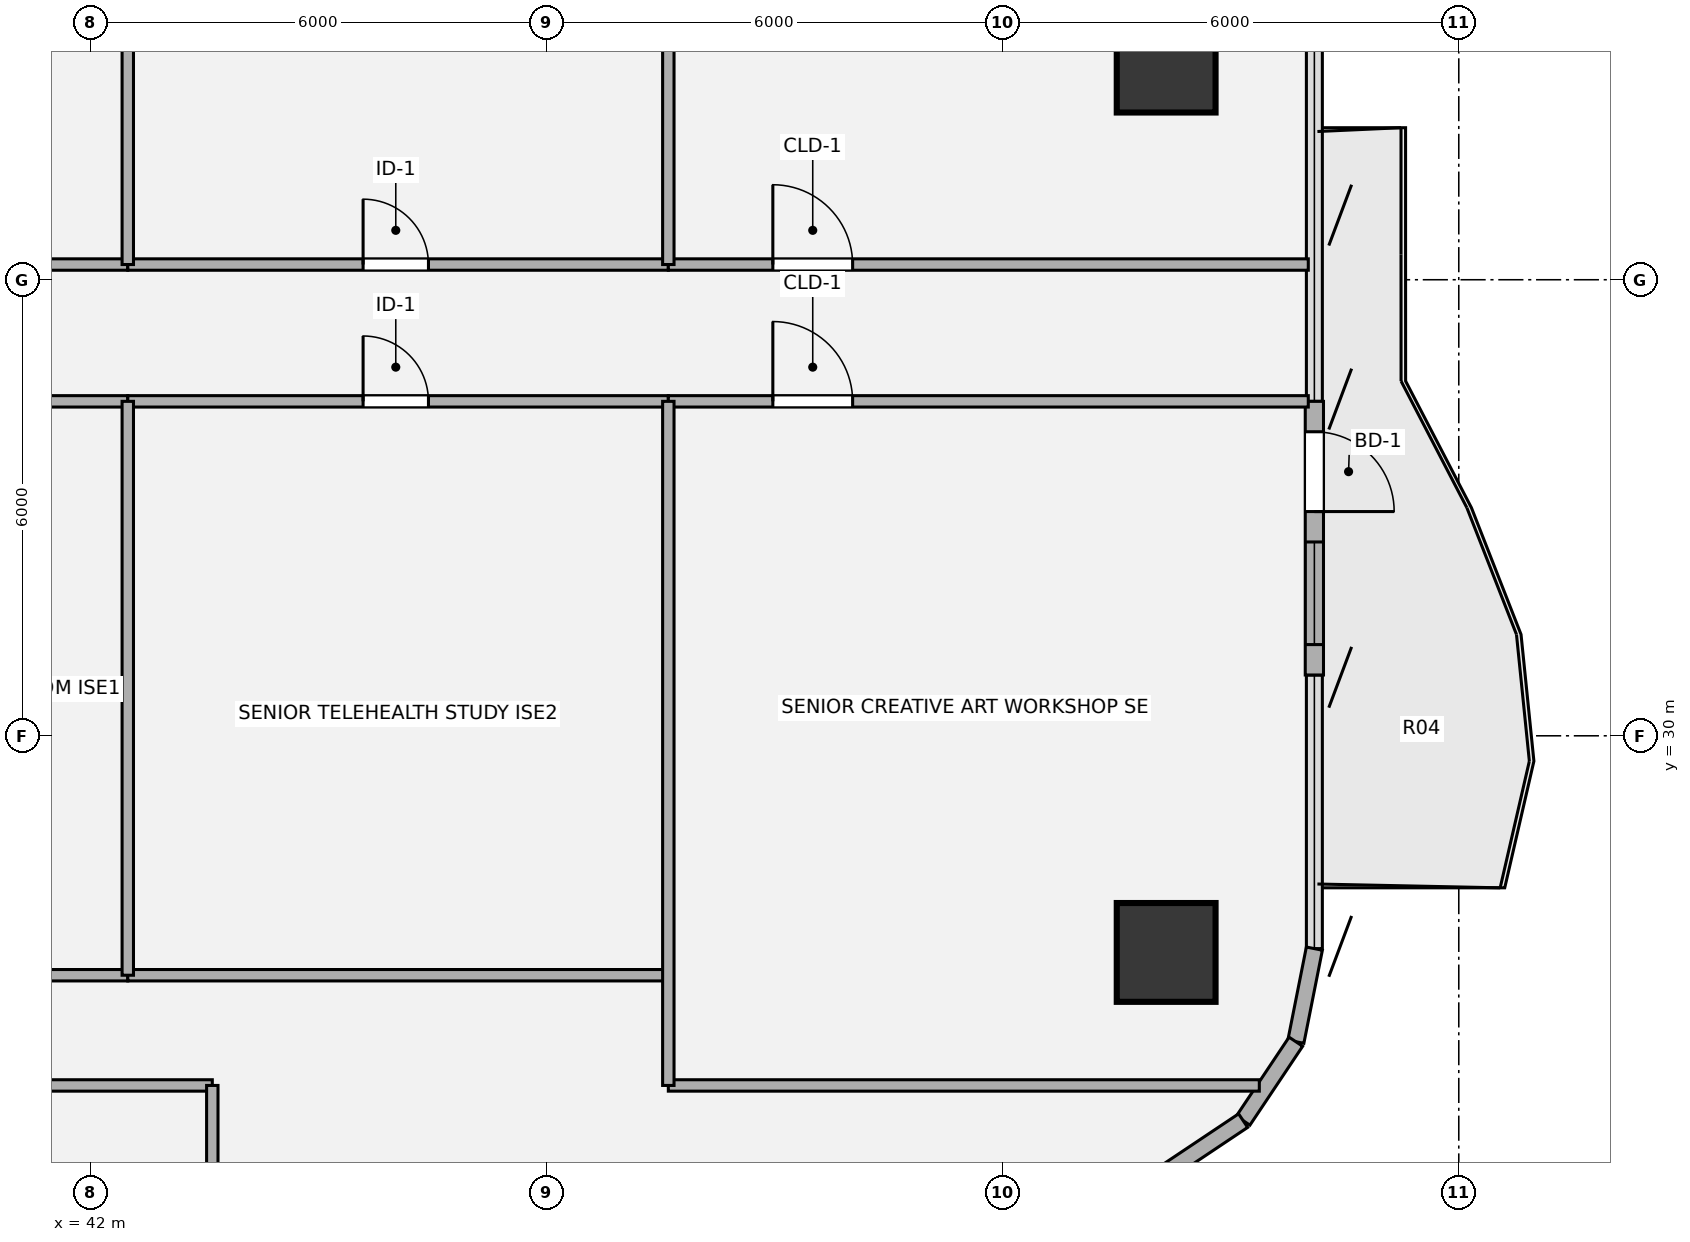
"""IFC4 building model, lengths in metres.
Left out: names, types, materials, properties, quantities, classifications, styles, units other than length and angle.
Written with IfcOpenShell. Run it as: python <this file> out.ifc"""

import sys

from ifc_helpers import new_model, si_unit, direction, frame, frame_2d, origin, origin_2d, place, context, subcontext, project, spatial, rectangle, hollow_circle, extrude, source, transform, mapped, element, fill, save


model = new_model("IFC4")
c1 = context("Model", 3, precision=1e-05, world=origin(), true_north=direction((0.0, 1.0)))
c2 = subcontext(c1, "Body", "Model", "MODEL_VIEW")
j1 = project(units=[si_unit("LENGTHUNIT", "METRE"), si_unit("PLANEANGLEUNIT", "RADIAN")], contexts=[c1])
p1 = place(None, origin())
s1 = spatial("IfcSite", under=j1, at=p1, CompositionType="ELEMENT")
p2 = place(p1, origin())
s2 = spatial("IfcBuilding", under=s1, at=p2, CompositionType="ELEMENT")
p3 = place(p2, frame((0.0, 0.0, 120.06)))
s3 = spatial("IfcBuildingStorey", under=s2, at=p3, CompositionType="ELEMENT", Elevation=120.06)
m1 = source(origin(), c2, "Body", "SweptSolid", [
    extrude(hollow_circle(Radius=0.65, WallThickness=0.045, at=origin_2d()), origin(), (0.0, 0.0, 1.0), 3.78),
])
for number, where, z_axis, x_axis in (
    (1, (56.15, 27.15, 0.0), (0.0, 0.0, 1.0), (1.0, 0.0, 0.0)),
    (2, (56.15, 38.85, 0.0), (0.0, 0.0, 1.0), (1.0, 0.0, 0.0)),
):
    element("IfcColumn", number, at=place(p3, frame(where, z_axis=z_axis, x_axis=x_axis)), inside=s3, PredefinedType="COLUMN", context=c2, shape_type="MappedRepresentation", body=[
        mapped(m1, transform((0.0, 0.0, 0.0), x_axis=(1.0, 0.0, 0.0), y_axis=(0.0, 1.0, 0.0), z_axis=(0.0, 0.0, 1.0), scale=1.0)),
    ])
p4 = place(p3, frame((58.1, 34.4, 0.0), z_axis=(0.0, 0.0, 1.0), x_axis=(0.0, -1.0, 0.0)))
e3 = element("IfcWall", 3, at=p4, inside=s3, PredefinedType="SOLIDWALL", context=c2, shape_type="SweptSolid", body=[
    extrude(rectangle(XDim=3.6, YDim=0.24, at=frame_2d((1.8, 0.0))), origin(), (0.0, 0.0, 1.0), 3.53),
])
p5 = place(p4, frame((0.4, 0.0, 0.0)))
e4 = element("IfcOpeningElement", 4, at=p5, cuts=e3, PredefinedType="OPENING", context=c2, shape_type="SweptSolid", body=[
    extrude(rectangle(XDim=1.05, YDim=2.15, at=origin_2d()), frame((0.525, 0.13, 1.075), z_axis=(0.0, -1.0, 0.0), x_axis=(1.0, 0.0, 0.0)), (0.0, 0.0, 1.0), 0.26),
])
p6 = place(p4, frame((1.85, 0.0, 0.85)))
e5 = element("IfcOpeningElement", 5, at=p6, cuts=e3, PredefinedType="OPENING", context=c2, shape_type="SweptSolid", body=[
    extrude(rectangle(XDim=1.35, YDim=1.35, at=origin_2d()), frame((0.675, 0.13, 0.675), z_axis=(0.0, -1.0, 0.0), x_axis=(1.0, 0.0, 0.0)), (0.0, 0.0, 1.0), 0.26),
])
for number, where, z_axis, x_axis in (
    (6, (58.1, 27.2, 0.0), (0.0, 0.0, 1.0), (-0.195, -0.981, 0.0)),
    (7, (57.856, 25.975, 0.0), (0.0, 0.0, 1.0), (-0.556, -0.831, 0.0)),
    (8, (57.163, 24.937, 0.0), (0.0, 0.0, 1.0), (-0.831, -0.556, 0.0)),
):
    element("IfcWall", number, at=place(p3, frame(where, z_axis=z_axis, x_axis=x_axis)), inside=s3, PredefinedType="SOLIDWALL", context=c2, shape_type="SweptSolid", body=[
        extrude(rectangle(XDim=1.249, YDim=0.215, at=frame_2d((0.624, 0.0))), origin(), (0.0, 0.0, 1.0), 3.53),
    ])
p7 = place(p3, frame((36.9, 25.4, 0.0), z_axis=(0.0, 0.0, 1.0), x_axis=(1.0, 0.0, 0.0)))
e9 = element("IfcWall", 9, at=p7, inside=s3, PredefinedType="PARTITIONING", context=c2, shape_type="SweptSolid", body=[
    extrude(rectangle(XDim=6.7, YDim=0.15, at=frame_2d((3.35, 0.0))), origin(), (0.0, 0.0, 1.0), 3.5),
])
p8 = place(p3, frame((49.6, 25.4, 0.0), z_axis=(0.0, 0.0, 1.0), x_axis=(1.0, 0.0, 0.0)))
e10 = element("IfcWall", 10, at=p8, inside=s3, PredefinedType="PARTITIONING", context=c2, shape_type="SweptSolid", body=[
    extrude(rectangle(XDim=7.776, YDim=0.15, at=frame_2d((3.888, 0.0))), origin(), (0.0, 0.0, 1.0), 3.5),
])
p9 = place(p3, frame((36.9, 26.85, 0.0), z_axis=(0.0, 0.0, 1.0), x_axis=(1.0, 0.0, 0.0)))
e11 = element("IfcWall", 11, at=p9, inside=s3, PredefinedType="PARTITIONING", context=c2, shape_type="SweptSolid", body=[
    extrude(rectangle(XDim=5.588, YDim=0.15, at=frame_2d((2.794, 0.0))), origin(), (0.0, 0.0, 1.0), 2.903),
])
p10 = place(p3, frame((42.488, 26.85, 0.0), z_axis=(0.0, 0.0, 1.0), x_axis=(1.0, 0.0, 0.0)))
e12 = element("IfcWall", 12, at=p10, inside=s3, PredefinedType="PARTITIONING", context=c2, shape_type="SweptSolid", body=[
    extrude(rectangle(XDim=7.112, YDim=0.15, at=frame_2d((3.556, 0.0))), origin(), (0.0, 0.0, 1.0), 3.055),
])
p11 = place(p3, frame((36.9, 34.4, 0.0), z_axis=(0.0, 0.0, 1.0), x_axis=(1.0, 0.0, 0.0)))
e13 = element("IfcWall", 13, at=p11, inside=s3, PredefinedType="PARTITIONING", context=c2, shape_type="SweptSolid", body=[
    extrude(rectangle(XDim=5.588, YDim=0.15, at=frame_2d((2.794, 0.0))), origin(), (0.0, 0.0, 1.0), 2.982),
])
p12 = place(p11, frame((2.334, 0.0, 0.0)))
e14 = element("IfcOpeningElement", 14, at=p12, cuts=e13, PredefinedType="OPENING", context=c2, shape_type="SweptSolid", body=[
    extrude(rectangle(XDim=0.86, YDim=2.1, at=origin_2d()), frame((0.43, 0.085, 1.05), z_axis=(0.0, -1.0, 0.0), x_axis=(1.0, 0.0, 0.0)), (0.0, 0.0, 1.0), 0.17),
])
p13 = place(p3, frame((42.488, 34.4, 0.0), z_axis=(0.0, 0.0, 1.0), x_axis=(1.0, 0.0, 0.0)))
e15 = element("IfcWall", 15, at=p13, inside=s3, PredefinedType="PARTITIONING", context=c2, shape_type="SweptSolid", body=[
    extrude(rectangle(XDim=7.112, YDim=0.15, at=frame_2d((3.556, 0.0))), origin(), (0.0, 0.0, 1.0), 2.982),
])
p14 = place(p13, frame((3.096, 0.0, 0.0)))
e16 = element("IfcOpeningElement", 16, at=p14, cuts=e15, PredefinedType="OPENING", context=c2, shape_type="SweptSolid", body=[
    extrude(rectangle(XDim=0.86, YDim=2.1, at=origin_2d()), frame((0.43, 0.085, 1.05), z_axis=(0.0, -1.0, 0.0), x_axis=(1.0, 0.0, 0.0)), (0.0, 0.0, 1.0), 0.17),
])
p15 = place(p3, frame((49.6, 34.4, 0.0), z_axis=(0.0, 0.0, 1.0), x_axis=(1.0, 0.0, 0.0)))
e17 = element("IfcWall", 17, at=p15, inside=s3, PredefinedType="PARTITIONING", context=c2, shape_type="SweptSolid", body=[
    extrude(rectangle(XDim=8.42, YDim=0.15, at=frame_2d((4.21, 0.0))), origin(), (0.0, 0.0, 1.0), 2.982),
])
p16 = place(p15, frame((1.375, 0.0, 0.0)))
e18 = element("IfcOpeningElement", 18, at=p16, cuts=e17, PredefinedType="OPENING", context=c2, shape_type="SweptSolid", body=[
    extrude(rectangle(XDim=1.05, YDim=2.1, at=origin_2d()), frame((0.525, 0.085, 1.05), z_axis=(0.0, -1.0, 0.0), x_axis=(1.0, 0.0, 0.0)), (0.0, 0.0, 1.0), 0.17),
])
p17 = place(p3, frame((36.9, 36.2, 0.0), z_axis=(0.0, 0.0, 1.0), x_axis=(1.0, 0.0, 0.0)))
e19 = element("IfcWall", 19, at=p17, inside=s3, PredefinedType="PARTITIONING", context=c2, shape_type="SweptSolid", body=[
    extrude(rectangle(XDim=5.588, YDim=0.15, at=frame_2d((2.794, 0.0))), origin(), (0.0, 0.0, 1.0), 2.982),
])
p18 = place(p17, frame((2.334, 0.0, 0.0)))
e20 = element("IfcOpeningElement", 20, at=p18, cuts=e19, PredefinedType="OPENING", context=c2, shape_type="SweptSolid", body=[
    extrude(rectangle(XDim=0.86, YDim=2.1, at=origin_2d()), frame((0.43, 0.085, 1.05), z_axis=(0.0, -1.0, 0.0), x_axis=(1.0, 0.0, 0.0)), (0.0, 0.0, 1.0), 0.17),
])
p19 = place(p3, frame((42.488, 36.2, 0.0), z_axis=(0.0, 0.0, 1.0), x_axis=(1.0, 0.0, 0.0)))
e21 = element("IfcWall", 21, at=p19, inside=s3, PredefinedType="PARTITIONING", context=c2, shape_type="SweptSolid", body=[
    extrude(rectangle(XDim=7.112, YDim=0.15, at=frame_2d((3.556, 0.0))), origin(), (0.0, 0.0, 1.0), 2.982),
])
p20 = place(p19, frame((3.096, 0.0, 0.0)))
e22 = element("IfcOpeningElement", 22, at=p20, cuts=e21, PredefinedType="OPENING", context=c2, shape_type="SweptSolid", body=[
    extrude(rectangle(XDim=0.86, YDim=2.1, at=origin_2d()), frame((0.43, 0.085, 1.05), z_axis=(0.0, -1.0, 0.0), x_axis=(1.0, 0.0, 0.0)), (0.0, 0.0, 1.0), 0.17),
])
p21 = place(p3, frame((49.6, 36.2, 0.0), z_axis=(0.0, 0.0, 1.0), x_axis=(1.0, 0.0, 0.0)))
e23 = element("IfcWall", 23, at=p21, inside=s3, PredefinedType="PARTITIONING", context=c2, shape_type="SweptSolid", body=[
    extrude(rectangle(XDim=8.42, YDim=0.15, at=frame_2d((4.21, 0.0))), origin(), (0.0, 0.0, 1.0), 2.982),
])
p22 = place(p21, frame((1.375, 0.0, 0.0)))
e24 = element("IfcOpeningElement", 24, at=p22, cuts=e23, PredefinedType="OPENING", context=c2, shape_type="SweptSolid", body=[
    extrude(rectangle(XDim=1.05, YDim=2.1, at=origin_2d()), frame((0.525, 0.085, 1.05), z_axis=(0.0, -1.0, 0.0), x_axis=(1.0, 0.0, 0.0)), (0.0, 0.0, 1.0), 0.17),
])
p23 = place(p3, frame((42.488, 26.85, 0.0), z_axis=(0.0, 0.0, 1.0), x_axis=(0.0, 1.0, 0.0)))
e25 = element("IfcWall", 25, at=p23, inside=s3, PredefinedType="PARTITIONING", context=c2, shape_type="SweptSolid", body=[
    extrude(rectangle(XDim=7.55, YDim=0.15, at=frame_2d((3.775, 0.0))), origin(), (0.0, 0.0, 1.0), 3.5),
])
p24 = place(p3, frame((42.488, 36.2, 0.0), z_axis=(0.0, 0.0, 1.0), x_axis=(0.0, 1.0, 0.0)))
e26 = element("IfcWall", 26, at=p24, inside=s3, PredefinedType="PARTITIONING", context=c2, shape_type="SweptSolid", body=[
    extrude(rectangle(XDim=11.553, YDim=0.15, at=frame_2d((5.776, 0.0))), origin(), (0.0, 0.0, 1.0), 3.5),
])
p25 = place(p3, frame((43.6, 21.958, 0.0), z_axis=(0.0, 0.0, 1.0), x_axis=(0.0, 1.0, 0.0)))
e27 = element("IfcWall", 27, at=p25, inside=s3, PredefinedType="PARTITIONING", context=c2, shape_type="SweptSolid", body=[
    extrude(rectangle(XDim=3.442, YDim=0.15, at=frame_2d((1.721, 0.0))), origin(), (0.0, 0.0, 1.0), 3.5),
])
p26 = place(p3, frame((49.6, 25.4, 0.0), z_axis=(0.0, 0.0, 1.0), x_axis=(0.0, 1.0, 0.0)))
e28 = element("IfcWall", 28, at=p26, inside=s3, PredefinedType="PARTITIONING", context=c2, shape_type="SweptSolid", body=[
    extrude(rectangle(XDim=9.0, YDim=0.15, at=frame_2d((4.5, 0.0))), origin(), (0.0, 0.0, 1.0), 3.5),
])
p27 = place(p3, frame((49.6, 36.2, 0.0), z_axis=(0.0, 0.0, 1.0), x_axis=(0.0, 1.0, 0.0)))
e29 = element("IfcWall", 29, at=p27, inside=s3, PredefinedType="PARTITIONING", context=c2, shape_type="SweptSolid", body=[
    extrude(rectangle(XDim=11.121, YDim=0.15, at=frame_2d((5.561, 0.0))), origin(), (0.0, 0.0, 1.0), 3.5),
])
m2 = source(origin(), c2, "Body", "SweptSolid", [
    extrude(rectangle(XDim=1.05, YDim=2.15, at=origin_2d()), frame((0.525, 0.025, 1.075), z_axis=(0.0, -1.0, 0.0), x_axis=(1.0, 0.0, 0.0)), (0.0, 0.0, 1.0), 0.05),
])
p28 = place(p5, origin())
e30 = element("IfcDoor", 30, at=p28, inside=s3, OperationType="SINGLE_SWING_RIGHT", PredefinedType="DOOR", context=c2, shape_type="MappedRepresentation", body=[
    mapped(m2, transform((0.0, 0.0, 0.0), x_axis=(1.0, 0.0, 0.0), y_axis=(0.0, 1.0, 0.0), z_axis=(0.0, 0.0, 1.0), scale=1.0)),
])
fill(e4, e30)
m3 = source(origin(), c2, "Body", "SweptSolid", [
    extrude(rectangle(XDim=1.35, YDim=1.35, at=origin_2d()), frame((0.675, 0.03, 0.675), z_axis=(0.0, -1.0, 0.0), x_axis=(1.0, 0.0, 0.0)), (0.0, 0.0, 1.0), 0.06),
])
p29 = place(p6, origin())
e31 = element("IfcWindow", 31, at=p29, inside=s3, PartitioningType="SINGLE_PANEL", PredefinedType="WINDOW", context=c2, shape_type="MappedRepresentation", body=[
    mapped(m3, transform((0.0, 0.0, 0.0), x_axis=(1.0, 0.0, 0.0), y_axis=(0.0, 1.0, 0.0), z_axis=(0.0, 0.0, 1.0), scale=1.0)),
])
fill(e5, e31)
m4 = source(origin(), c2, "Body", "SweptSolid", [
    extrude(rectangle(XDim=0.86, YDim=2.1, at=origin_2d()), frame((0.43, 0.025, 1.05), z_axis=(0.0, -1.0, 0.0), x_axis=(1.0, 0.0, 0.0)), (0.0, 0.0, 1.0), 0.05),
])
p30 = place(p14, origin())
e32 = element("IfcDoor", 32, at=p30, inside=s3, OperationType="SINGLE_SWING_LEFT", PredefinedType="DOOR", context=c2, shape_type="MappedRepresentation", body=[
    mapped(m4, transform((0.0, 0.0, 0.0), x_axis=(1.0, 0.0, 0.0), y_axis=(0.0, 1.0, 0.0), z_axis=(0.0, 0.0, 1.0), scale=1.0)),
])
fill(e16, e32)
m5 = source(origin(), c2, "Body", "SweptSolid", [
    extrude(rectangle(XDim=1.05, YDim=2.1, at=origin_2d()), frame((0.525, 0.025, 1.05), z_axis=(0.0, -1.0, 0.0), x_axis=(1.0, 0.0, 0.0)), (0.0, 0.0, 1.0), 0.05),
])
p31 = place(p16, origin())
e33 = element("IfcDoor", 33, at=p31, inside=s3, OperationType="SINGLE_SWING_LEFT", PredefinedType="DOOR", context=c2, shape_type="MappedRepresentation", body=[
    mapped(m5, transform((0.0, 0.0, 0.0), x_axis=(1.0, 0.0, 0.0), y_axis=(0.0, 1.0, 0.0), z_axis=(0.0, 0.0, 1.0), scale=1.0)),
])
fill(e18, e33)
p32 = place(p20, origin())
e34 = element("IfcDoor", 34, at=p32, inside=s3, OperationType="SINGLE_SWING_LEFT", PredefinedType="DOOR", context=c2, shape_type="MappedRepresentation", body=[
    mapped(m4, transform((0.0, 0.0, 0.0), x_axis=(1.0, 0.0, 0.0), y_axis=(0.0, 1.0, 0.0), z_axis=(0.0, 0.0, 1.0), scale=1.0)),
])
fill(e22, e34)
p33 = place(p22, origin())
e35 = element("IfcDoor", 35, at=p33, inside=s3, OperationType="SINGLE_SWING_LEFT", PredefinedType="DOOR", context=c2, shape_type="MappedRepresentation", body=[
    mapped(m5, transform((0.0, 0.0, 0.0), x_axis=(1.0, 0.0, 0.0), y_axis=(0.0, 1.0, 0.0), z_axis=(0.0, 0.0, 1.0), scale=1.0)),
])
fill(e24, e35)
save(model, sys.argv[1])
